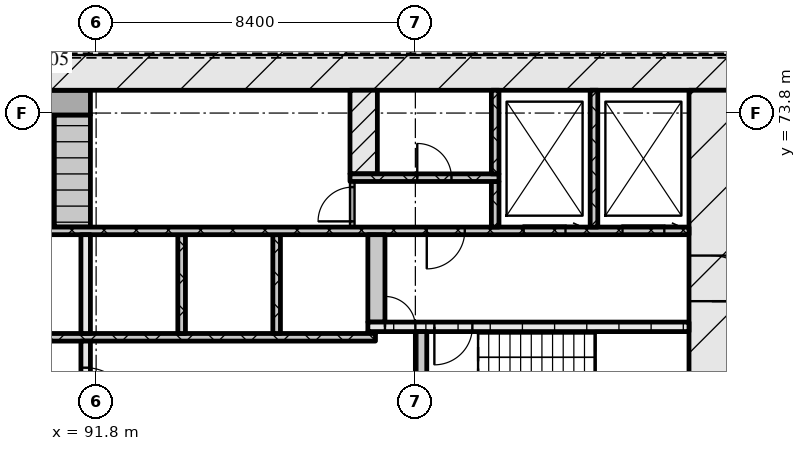
"""IFC4 building model, lengths in metres.
Left out: names, types, materials, properties, quantities, classifications, styles, units other than length and angle.
Written with IfcOpenShell. Run it as: python <this file> out.ifc"""

import sys

from ifc_helpers import new_model, si_unit, direction, frame, frame_2d, origin, place, context, subcontext, project, spatial, rectangle, extrude, element, fill, save


model = new_model("IFC4")
c1 = context("Model", 3, precision=1e-05, world=origin(), true_north=direction((0.0, 1.0)))
c2 = subcontext(c1, "Body", "Model", "MODEL_VIEW")
j1 = project(units=[si_unit("LENGTHUNIT", "METRE"), si_unit("PLANEANGLEUNIT", "RADIAN")], contexts=[c1])
p1 = place(None, origin())
s1 = spatial("IfcSite", under=j1, at=p1, CompositionType="ELEMENT")
p2 = place(p1, origin())
s2 = spatial("IfcBuilding", under=s1, at=p2, CompositionType="ELEMENT")
p3 = place(p2, frame((0.0, 0.0, 19.2)))
s3 = spatial("IfcBuildingStorey", under=s2, at=p3, CompositionType="ELEMENT", Elevation=19.2)
p4 = place(p3, frame((66.6, 75.0, 0.0), z_axis=(0.0, 0.0, 1.0), x_axis=(1.0, 0.0, 0.0)))
e1 = element("IfcWall", 1, at=p4, inside=s3, PredefinedType="SOLIDWALL", context=c2, shape_type="SweptSolid", body=[
    extrude(rectangle(XDim=42.0, YDim=1.2, at=frame_2d((21.0, 0.0))), origin(), (0.0, 0.0, 1.0), 4.2),
])
p5 = place(p3, frame((108.0, 62.4, 0.0), z_axis=(0.0, 0.0, 1.0), x_axis=(0.0, 1.0, 0.0)))
e2 = element("IfcWall", 2, at=p5, inside=s3, PredefinedType="SOLIDWALL", context=c2, shape_type="SweptSolid", body=[
    extrude(rectangle(XDim=12.0, YDim=1.2, at=frame_2d((6.0, 0.0))), origin(), (0.0, 0.0, 1.0), 4.2),
])
p6 = place(p5, frame((6.45, 0.0, 0.0)))
e3 = element("IfcOpeningElement", 3, at=p6, cuts=e2, PredefinedType="OPENING", context=c2, shape_type="SweptSolid", body=[
    extrude(rectangle(XDim=1.2, YDim=2.1, at=frame_2d((0.6, 1.05))), frame((0.0, 0.61, 0.0), z_axis=(0.0, -1.0, 0.0), x_axis=(1.0, 0.0, 0.0)), (0.0, 0.0, 1.0), 1.22),
])
p7 = place(p3, frame((91.525, 65.2, 0.0), z_axis=(0.0, 0.0, 1.0), x_axis=(0.0, 1.0, 0.0)))
e4 = element("IfcWall", 4, at=p7, inside=s3, PredefinedType="SOLIDWALL", context=c2, shape_type="SweptSolid", body=[
    extrude(rectangle(XDim=2.6, YDim=0.25, at=frame_2d((1.3, 0.0))), origin(), (0.0, 0.0, 1.0), 4.2),
])
p8 = place(p7, frame((0.7, 0.0, 0.0)))
e5 = element("IfcOpeningElement", 5, at=p8, cuts=e4, PredefinedType="OPENING", context=c2, shape_type="SweptSolid", body=[
    extrude(rectangle(XDim=1.2, YDim=2.1, at=frame_2d((0.6, 1.05))), frame((0.0, 0.135, 0.0), z_axis=(0.0, -1.0, 0.0), x_axis=(1.0, 0.0, 0.0)), (0.0, 0.0, 1.0), 0.27),
])
p9 = place(p3, frame((100.35, 65.2, 0.0), z_axis=(0.0, 0.0, 1.0), x_axis=(0.0, 1.0, 0.0)))
e6 = element("IfcWall", 6, at=p9, inside=s3, PredefinedType="SOLIDWALL", context=c2, shape_type="SweptSolid", body=[
    extrude(rectangle(XDim=2.85, YDim=0.3, at=frame_2d((1.425, 0.0))), origin(), (0.0, 0.0, 1.0), 4.2),
])
p10 = place(p3, frame((76.05, 67.9, 0.0), z_axis=(0.0, 0.0, 1.0), x_axis=(1.0, 0.0, 0.0)))
e7 = element("IfcWall", 7, at=p10, inside=s3, PredefinedType="SOLIDWALL", context=c2, shape_type="SweptSolid", body=[
    extrude(rectangle(XDim=23.1, YDim=0.2, at=frame_2d((11.55, 0.0))), origin(), (0.0, 0.0, 1.0), 4.2),
])
p11 = place(p10, frame((8.35, 0.0, 0.0)))
e8 = element("IfcOpeningElement", 8, at=p11, cuts=e7, PredefinedType="OPENING", context=c2, shape_type="SweptSolid", body=[
    extrude(rectangle(XDim=1.1, YDim=2.1, at=frame_2d((0.55, 1.05))), frame((0.0, 0.11, 0.0), z_axis=(0.0, -1.0, 0.0), x_axis=(1.0, 0.0, 0.0)), (0.0, 0.0, 1.0), 0.22),
])
p12 = place(p10, frame((10.85, 0.0, 0.0)))
e9 = element("IfcOpeningElement", 9, at=p12, cuts=e7, PredefinedType="OPENING", context=c2, shape_type="SweptSolid", body=[
    extrude(rectangle(XDim=1.1, YDim=2.1, at=frame_2d((0.55, 1.05))), frame((0.0, 0.11, 0.0), z_axis=(0.0, -1.0, 0.0), x_axis=(1.0, 0.0, 0.0)), (0.0, 0.0, 1.0), 0.22),
])
p13 = place(p10, frame((13.55, 0.0, 0.0)))
e10 = element("IfcOpeningElement", 10, at=p13, cuts=e7, PredefinedType="OPENING", context=c2, shape_type="SweptSolid", body=[
    extrude(rectangle(XDim=1.0, YDim=2.1, at=frame_2d((0.5, 1.05))), frame((0.0, 0.11, 0.0), z_axis=(0.0, -1.0, 0.0), x_axis=(1.0, 0.0, 0.0)), (0.0, 0.0, 1.0), 0.22),
])
p14 = place(p3, frame((91.525, 68.0, 0.0), z_axis=(0.0, 0.0, 1.0), x_axis=(0.0, 1.0, 0.0)))
e11 = element("IfcWall", 11, at=p14, inside=s3, PredefinedType="SOLIDWALL", context=c2, shape_type="SweptSolid", body=[
    extrude(rectangle(XDim=2.6, YDim=0.25, at=frame_2d((1.3, 0.0))), origin(), (0.0, 0.0, 1.0), 4.2),
])
for number, where, z_axis, x_axis in (
    (12, (94.05, 68.0, 0.0), (0.0, 0.0, 1.0), (0.0, 1.0, 0.0)),
    (13, (96.55, 68.0, 0.0), (0.0, 0.0, 1.0), (0.0, 1.0, 0.0)),
):
    element("IfcWall", number, at=place(p3, frame(where, z_axis=z_axis, x_axis=x_axis)), inside=s3, PredefinedType="SOLIDWALL", context=c2, shape_type="SweptSolid", body=[
        extrude(rectangle(XDim=2.6, YDim=0.2, at=frame_2d((1.3, 0.0))), origin(), (0.0, 0.0, 1.0), 4.2),
    ])
p15 = place(p3, frame((98.95, 68.025, 0.0), z_axis=(0.0, 0.0, 1.0), x_axis=(1.0, 0.0, 0.0)))
e14 = element("IfcWall", 14, at=p15, inside=s3, PredefinedType="SOLIDWALL", context=c2, shape_type="SweptSolid", body=[
    extrude(rectangle(XDim=0.2, YDim=0.05, at=frame_2d((0.1, 0.0))), origin(), (0.0, 0.0, 1.0), 4.2),
])
p16 = place(p3, frame((98.95, 68.175, 0.0), z_axis=(0.0, 0.0, 1.0), x_axis=(1.0, 0.0, 0.0)))
e15 = element("IfcWall", 15, at=p16, inside=s3, PredefinedType="SOLIDWALL", context=c2, shape_type="SweptSolid", body=[
    extrude(rectangle(XDim=8.45, YDim=0.25, at=frame_2d((4.225, 0.0))), origin(), (0.0, 0.0, 1.0), 4.2),
])
p17 = place(p16, frame((0.45, 0.0, 0.0)))
e16 = element("IfcOpeningElement", 16, at=p17, cuts=e15, PredefinedType="OPENING", context=c2, shape_type="SweptSolid", body=[
    extrude(rectangle(XDim=0.8, YDim=2.1, at=frame_2d((0.4, 1.05))), frame((0.0, 0.135, 0.0), z_axis=(0.0, -1.0, 0.0), x_axis=(1.0, 0.0, 0.0)), (0.0, 0.0, 1.0), 0.27),
])
p18 = place(p16, frame((1.75, 0.0, 0.0)))
e17 = element("IfcOpeningElement", 17, at=p18, cuts=e15, PredefinedType="OPENING", context=c2, shape_type="SweptSolid", body=[
    extrude(rectangle(XDim=1.0, YDim=2.1, at=frame_2d((0.5, 1.05))), frame((0.0, 0.135, 0.0), z_axis=(0.0, -1.0, 0.0), x_axis=(1.0, 0.0, 0.0)), (0.0, 0.0, 1.0), 0.27),
])
p19 = place(p3, frame((99.175, 68.3, 0.0), z_axis=(0.0, 0.0, 1.0), x_axis=(0.0, 1.0, 0.0)))
e18 = element("IfcWall", 18, at=p19, inside=s3, PredefinedType="SOLIDWALL", context=c2, shape_type="SweptSolid", body=[
    extrude(rectangle(XDim=2.3, YDim=0.45, at=frame_2d((1.15, 0.0))), origin(), (0.0, 0.0, 1.0), 4.2),
])
p20 = place(p3, frame((67.8, 70.7, 0.0), z_axis=(0.0, 0.0, 1.0), x_axis=(1.0, 0.0, 0.0)))
e19 = element("IfcWall", 19, at=p20, inside=s3, PredefinedType="SOLIDWALL", context=c2, shape_type="SweptSolid", body=[
    extrude(rectangle(XDim=39.6, YDim=0.2, at=frame_2d((19.8, 0.0))), origin(), (0.0, 0.0, 1.0), 4.2),
])
p21 = place(p20, frame((0.65, 0.0, 0.0)))
e20 = element("IfcOpeningElement", 20, at=p21, cuts=e19, PredefinedType="OPENING", context=c2, shape_type="SweptSolid", body=[
    extrude(rectangle(XDim=1.1, YDim=2.1, at=frame_2d((0.55, 1.05))), frame((0.0, 0.11, 0.0), z_axis=(0.0, -1.0, 0.0), x_axis=(1.0, 0.0, 0.0)), (0.0, 0.0, 1.0), 0.22),
])
p22 = place(p20, frame((3.25, 0.0, 0.0)))
e21 = element("IfcOpeningElement", 21, at=p22, cuts=e19, PredefinedType="OPENING", context=c2, shape_type="SweptSolid", body=[
    extrude(rectangle(XDim=1.1, YDim=2.1, at=frame_2d((0.55, 1.05))), frame((0.0, 0.11, 0.0), z_axis=(0.0, -1.0, 0.0), x_axis=(1.0, 0.0, 0.0)), (0.0, 0.0, 1.0), 0.22),
])
p23 = place(p20, frame((5.9, 0.0, 0.0)))
e22 = element("IfcOpeningElement", 22, at=p23, cuts=e19, PredefinedType="OPENING", context=c2, shape_type="SweptSolid", body=[
    extrude(rectangle(XDim=1.0, YDim=2.1, at=frame_2d((0.5, 1.05))), frame((0.0, 0.11, 0.0), z_axis=(0.0, -1.0, 0.0), x_axis=(1.0, 0.0, 0.0)), (0.0, 0.0, 1.0), 0.22),
])
p24 = place(p20, frame((21.7, 0.0, 0.0)))
e23 = element("IfcOpeningElement", 23, at=p24, cuts=e19, PredefinedType="OPENING", context=c2, shape_type="SweptSolid", body=[
    extrude(rectangle(XDim=1.0, YDim=2.1, at=frame_2d((0.5, 1.05))), frame((0.0, 0.11, 0.0), z_axis=(0.0, -1.0, 0.0), x_axis=(1.0, 0.0, 0.0)), (0.0, 0.0, 1.0), 0.22),
])
p25 = place(p20, frame((32.7, 0.0, 0.0)))
e24 = element("IfcOpeningElement", 24, at=p25, cuts=e19, PredefinedType="OPENING", context=c2, shape_type="SweptSolid", body=[
    extrude(rectangle(XDim=1.0, YDim=2.1, at=frame_2d((0.5, 1.05))), frame((0.0, 0.11, 0.0), z_axis=(0.0, -1.0, 0.0), x_axis=(1.0, 0.0, 0.0)), (0.0, 0.0, 1.0), 0.22),
])
p26 = place(p20, frame((35.25, 0.0, 0.0)))
e25 = element("IfcOpeningElement", 25, at=p26, cuts=e19, PredefinedType="OPENING", context=c2, shape_type="SweptSolid", body=[
    extrude(rectangle(XDim=1.1, YDim=2.1, at=frame_2d((0.55, 1.05))), frame((0.0, 0.11, 0.0), z_axis=(0.0, -1.0, 0.0), x_axis=(1.0, 0.0, 0.0)), (0.0, 0.0, 1.0), 0.22),
])
p27 = place(p20, frame((37.85, 0.0, 0.0)))
e26 = element("IfcOpeningElement", 26, at=p27, cuts=e19, PredefinedType="OPENING", context=c2, shape_type="SweptSolid", body=[
    extrude(rectangle(XDim=1.1, YDim=2.1, at=frame_2d((0.55, 1.05))), frame((0.0, 0.11, 0.0), z_axis=(0.0, -1.0, 0.0), x_axis=(1.0, 0.0, 0.0)), (0.0, 0.0, 1.0), 0.22),
])
p28 = place(p3, frame((91.175, 70.8, 0.0), z_axis=(0.0, 0.0, 1.0), x_axis=(0.0, 1.0, 0.0)))
e27 = element("IfcWall", 27, at=p28, inside=s3, PredefinedType="SOLIDWALL", context=c2, shape_type="SweptSolid", body=[
    extrude(rectangle(XDim=2.95, YDim=0.95, at=frame_2d((1.475, 0.0))), origin(), (0.0, 0.0, 1.0), 4.2),
])
p29 = place(p3, frame((98.54, 70.8, 0.0), z_axis=(0.0, 0.0, 1.0), x_axis=(0.0, 1.0, 0.0)))
e28 = element("IfcWall", 28, at=p29, inside=s3, PredefinedType="PARTITIONING", context=c2, shape_type="SweptSolid", body=[
    extrude(rectangle(XDim=1.2, YDim=0.12, at=frame_2d((0.6, 0.0))), origin(), (0.0, 0.0, 1.0), 4.2),
])
p30 = place(p29, frame((0.15, 0.0, 0.0)))
e29 = element("IfcOpeningElement", 29, at=p30, cuts=e28, PredefinedType="OPENING", context=c2, shape_type="SweptSolid", body=[
    extrude(rectangle(XDim=0.9, YDim=2.1, at=frame_2d((0.45, 1.05))), frame((0.0, 0.07, 0.0), z_axis=(0.0, -1.0, 0.0), x_axis=(1.0, 0.0, 0.0)), (0.0, 0.0, 1.0), 0.14),
])
p31 = place(p3, frame((102.3, 70.8, 0.0), z_axis=(0.0, 0.0, 1.0), x_axis=(0.0, 1.0, 0.0)))
e30 = element("IfcWall", 30, at=p31, inside=s3, PredefinedType="SOLIDWALL", context=c2, shape_type="SweptSolid", body=[
    extrude(rectangle(XDim=1.2, YDim=0.2, at=frame_2d((0.6, 0.0))), origin(), (0.0, 0.0, 1.0), 4.2),
])
p32 = place(p3, frame((104.9, 70.8, 0.0), z_axis=(0.0, 0.0, 1.0), x_axis=(0.0, 1.0, 0.0)))
e31 = element("IfcWall", 31, at=p32, inside=s3, PredefinedType="SOLIDWALL", context=c2, shape_type="SweptSolid", body=[
    extrude(rectangle(XDim=3.6, YDim=0.2, at=frame_2d((1.8, 0.0))), origin(), (0.0, 0.0, 1.0), 4.2),
])
p33 = place(p3, frame((98.48, 72.1, 0.0), z_axis=(0.0, 0.0, 1.0), x_axis=(1.0, 0.0, 0.0)))
e32 = element("IfcWall", 32, at=p33, inside=s3, PredefinedType="SOLIDWALL", context=c2, shape_type="SweptSolid", body=[
    extrude(rectangle(XDim=3.92, YDim=0.2, at=frame_2d((1.96, 0.0))), origin(), (0.0, 0.0, 1.0), 4.2),
])
p34 = place(p33, frame((1.77, 0.0, 0.0)))
e33 = element("IfcOpeningElement", 33, at=p34, cuts=e32, PredefinedType="OPENING", context=c2, shape_type="SweptSolid", body=[
    extrude(rectangle(XDim=0.9, YDim=2.1, at=frame_2d((0.45, 1.05))), frame((0.0, 0.11, 0.0), z_axis=(0.0, -1.0, 0.0), x_axis=(1.0, 0.0, 0.0)), (0.0, 0.0, 1.0), 0.22),
])
p35 = place(p3, frame((98.84, 72.2, 0.0), z_axis=(0.0, 0.0, 1.0), x_axis=(0.0, 1.0, 0.0)))
e34 = element("IfcWall", 34, at=p35, inside=s3, PredefinedType="SOLIDWALL", context=c2, shape_type="SweptSolid", body=[
    extrude(rectangle(XDim=2.2, YDim=0.72, at=frame_2d((1.1, 0.0))), origin(), (0.0, 0.0, 1.0), 4.2),
])
p36 = place(p3, frame((102.3, 72.2, 0.0), z_axis=(0.0, 0.0, 1.0), x_axis=(0.0, 1.0, 0.0)))
e35 = element("IfcWall", 35, at=p36, inside=s3, PredefinedType="SOLIDWALL", context=c2, shape_type="SweptSolid", body=[
    extrude(rectangle(XDim=2.2, YDim=0.2, at=frame_2d((1.1, 0.0))), origin(), (0.0, 0.0, 1.0), 4.2),
])
p37 = place(p3, frame((83.55, 74.075, 0.0), z_axis=(0.0, 0.0, 1.0), x_axis=(1.0, 0.0, 0.0)))
e36 = element("IfcWall", 36, at=p37, inside=s3, PredefinedType="SOLIDWALL", context=c2, shape_type="SweptSolid", body=[
    extrude(rectangle(XDim=8.1, YDim=0.65, at=frame_2d((4.05, 0.0))), origin(), (0.0, 0.0, 1.0), 4.2),
])
p38 = place(p8, origin())
e37 = element("IfcDoor", 37, at=p38, inside=s3, OperationType="SINGLE_SWING_RIGHT", PredefinedType="DOOR", context=c2, shape_type="SweptSolid", body=[
    extrude(rectangle(XDim=1.2, YDim=2.1, at=frame_2d((0.6, 1.05))), frame((0.0, 0.025, 0.0), z_axis=(0.0, -1.0, 0.0), x_axis=(1.0, 0.0, 0.0)), (0.0, 0.0, 1.0), 0.05),
])
fill(e5, e37)
p39 = place(p17, origin())
e38 = element("IfcDoor", 38, at=p39, inside=s3, OperationType="SINGLE_SWING_LEFT", PredefinedType="DOOR", context=c2, shape_type="SweptSolid", body=[
    extrude(rectangle(XDim=0.8, YDim=2.1, at=frame_2d((0.4, 1.05))), frame((0.0, 0.025, 0.0), z_axis=(0.0, -1.0, 0.0), x_axis=(1.0, 0.0, 0.0)), (0.0, 0.0, 1.0), 0.05),
])
fill(e16, e38)
p40 = place(p18, origin())
e39 = element("IfcDoor", 39, at=p40, inside=s3, OperationType="SINGLE_SWING_RIGHT", PredefinedType="DOOR", context=c2, shape_type="SweptSolid", body=[
    extrude(rectangle(XDim=1.0, YDim=2.1, at=frame_2d((0.5, 1.05))), frame((0.0, 0.025, 0.0), z_axis=(0.0, -1.0, 0.0), x_axis=(1.0, 0.0, 0.0)), (0.0, 0.0, 1.0), 0.05),
])
fill(e17, e39)
p41 = place(p6, origin())
e40 = element("IfcDoor", 40, at=p41, inside=s3, OperationType="SINGLE_SWING_RIGHT", PredefinedType="DOOR", context=c2, shape_type="SweptSolid", body=[
    extrude(rectangle(XDim=1.2, YDim=2.1, at=frame_2d((0.6, 1.05))), frame((0.0, 0.025, 0.0), z_axis=(0.0, -1.0, 0.0), x_axis=(1.0, 0.0, 0.0)), (0.0, 0.0, 1.0), 0.05),
])
fill(e3, e40)
p42 = place(p25, origin())
e41 = element("IfcDoor", 41, at=p42, inside=s3, OperationType="SINGLE_SWING_RIGHT", PredefinedType="DOOR", context=c2, shape_type="SweptSolid", body=[
    extrude(rectangle(XDim=1.0, YDim=2.1, at=frame_2d((0.5, 1.05))), frame((0.0, 0.025, 0.0), z_axis=(0.0, -1.0, 0.0), x_axis=(1.0, 0.0, 0.0)), (0.0, 0.0, 1.0), 0.05),
])
fill(e24, e41)
p43 = place(p26, origin())
e42 = element("IfcDoor", 42, at=p43, inside=s3, OperationType="SLIDING_TO_RIGHT", PredefinedType="DOOR", context=c2, shape_type="SweptSolid", body=[
    extrude(rectangle(XDim=1.1, YDim=2.1, at=frame_2d((0.55, 1.05))), frame((0.0, 0.025, 0.0), z_axis=(0.0, -1.0, 0.0), x_axis=(1.0, 0.0, 0.0)), (0.0, 0.0, 1.0), 0.05),
])
fill(e25, e42)
p44 = place(p27, origin())
e43 = element("IfcDoor", 43, at=p44, inside=s3, OperationType="SLIDING_TO_RIGHT", PredefinedType="DOOR", context=c2, shape_type="SweptSolid", body=[
    extrude(rectangle(XDim=1.1, YDim=2.1, at=frame_2d((0.55, 1.05))), frame((0.0, 0.025, 0.0), z_axis=(0.0, -1.0, 0.0), x_axis=(1.0, 0.0, 0.0)), (0.0, 0.0, 1.0), 0.05),
])
fill(e26, e43)
p45 = place(p30, origin())
e44 = element("IfcDoor", 44, at=p45, inside=s3, OperationType="SINGLE_SWING_LEFT", PredefinedType="DOOR", context=c2, shape_type="SweptSolid", body=[
    extrude(rectangle(XDim=0.9, YDim=2.1, at=frame_2d((0.45, 1.05))), frame((0.0, 0.025, 0.0), z_axis=(0.0, -1.0, 0.0), x_axis=(1.0, 0.0, 0.0)), (0.0, 0.0, 1.0), 0.05),
])
fill(e29, e44)
p46 = place(p34, origin())
e45 = element("IfcDoor", 45, at=p46, inside=s3, OperationType="SINGLE_SWING_LEFT", PredefinedType="DOOR", context=c2, shape_type="SweptSolid", body=[
    extrude(rectangle(XDim=0.9, YDim=2.1, at=frame_2d((0.45, 1.05))), frame((0.0, 0.025, 0.0), z_axis=(0.0, -1.0, 0.0), x_axis=(1.0, 0.0, 0.0)), (0.0, 0.0, 1.0), 0.05),
])
fill(e33, e45)
save(model, sys.argv[1])
